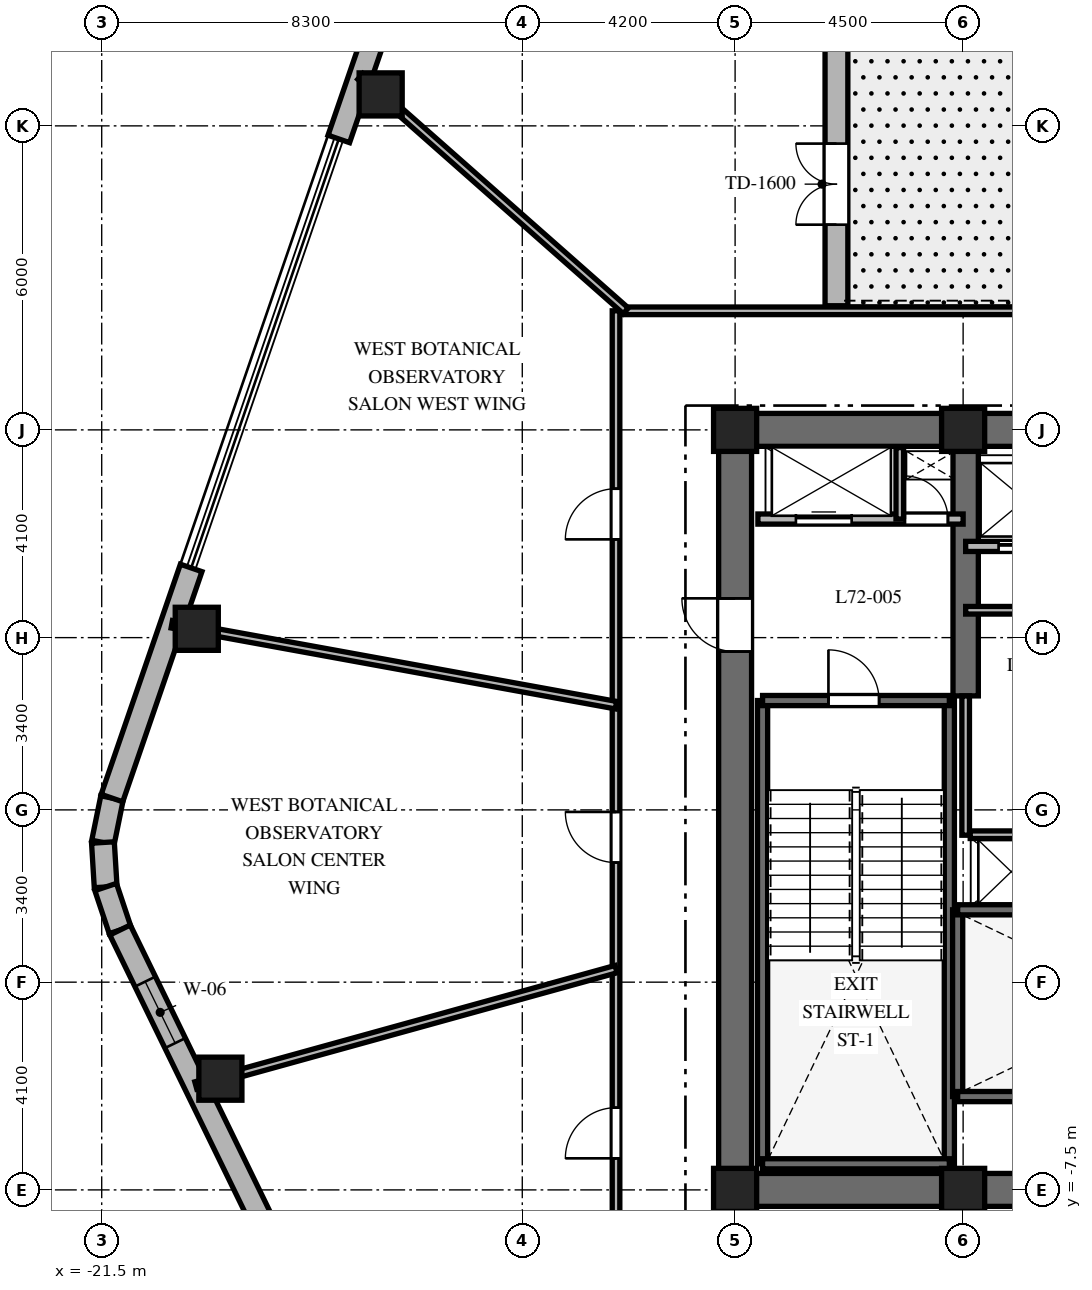
"""IFC4 building model, lengths in metres.
Left out: names, types, materials, properties, quantities, classifications, styles, units other than length and angle.
Written with IfcOpenShell. Run it as: python <this file> out.ifc"""

import sys

from ifc_helpers import new_model, si_unit, direction, frame, frame_2d, origin, origin_2d, place, context, subcontext, project, spatial, rectangle, extrude, element, fill, save


model = new_model("IFC4")
c1 = context("Model", 3, precision=1e-05, world=origin(), true_north=direction((0.0, 1.0)))
c2 = subcontext(c1, "Body", "Model", "MODEL_VIEW")
j1 = project(units=[si_unit("LENGTHUNIT", "METRE"), si_unit("PLANEANGLEUNIT", "RADIAN")], contexts=[c1])
p1 = place(None, origin())
s1 = spatial("IfcSite", under=j1, at=p1, CompositionType="ELEMENT")
p2 = place(p1, origin())
s2 = spatial("IfcBuilding", under=s1, at=p2, CompositionType="ELEMENT")
p3 = place(p2, frame((0.0, 0.0, 288.6)))
s3 = spatial("IfcBuildingStorey", under=s2, at=p3, CompositionType="ELEMENT", Elevation=288.6)
p4 = place(p3, frame((-9.325, -7.5, 0.0), z_axis=(0.0, 0.0, 1.0), x_axis=(1.0, 0.0, 0.0)))
e1 = element("IfcWall", 1, at=p4, inside=s3, PredefinedType="SHEAR", context=c2, shape_type="SweptSolid", body=[
    extrude(rectangle(XDim=18.65, YDim=0.65, at=frame_2d((9.325, 0.0))), origin(), (0.0, 0.0, 1.0), 4.5),
])
p5 = place(p4, frame((9.375, 0.0, 0.0)))
e2 = element("IfcOpeningElement", 2, at=p5, cuts=e1, PredefinedType="OPENING", context=c2, shape_type="SweptSolid", body=[
    extrude(rectangle(XDim=1.0, YDim=2.15, at=frame_2d((0.5, 1.075))), frame((0.0, 0.335, 0.0), z_axis=(0.0, -1.0, 0.0), x_axis=(1.0, 0.0, 0.0)), (0.0, 0.0, 1.0), 0.67),
])
p6 = place(p3, frame((-9.325, 7.5, 0.0), z_axis=(0.0, 0.0, 1.0), x_axis=(1.0, 0.0, 0.0)))
e3 = element("IfcWall", 3, at=p6, inside=s3, PredefinedType="SHEAR", context=c2, shape_type="SweptSolid", body=[
    extrude(rectangle(XDim=9.375, YDim=0.65, at=frame_2d((4.688, 0.0))), origin(), (0.0, 0.0, 1.0), 4.5),
])
p7 = place(p3, frame((-9.0, -7.175, 0.0), z_axis=(0.0, 0.0, 1.0), x_axis=(0.0, 1.0, 0.0)))
e4 = element("IfcWall", 4, at=p7, inside=s3, PredefinedType="SHEAR", context=c2, shape_type="SweptSolid", body=[
    extrude(rectangle(XDim=14.35, YDim=0.65, at=frame_2d((7.175, 0.0))), origin(), (0.0, 0.0, 1.0), 4.5),
])
p8 = place(p7, frame((10.3, 0.0, 0.0)))
e5 = element("IfcOpeningElement", 5, at=p8, cuts=e4, PredefinedType="OPENING", context=c2, shape_type="SweptSolid", body=[
    extrude(rectangle(XDim=1.05, YDim=2.15, at=frame_2d((0.525, 1.075))), frame((0.0, 0.335, 0.0), z_axis=(0.0, -1.0, 0.0), x_axis=(1.0, 0.0, 0.0)), (0.0, 0.0, 1.0), 0.67),
])
p9 = place(p3, frame((-4.45, 2.25, 0.0), z_axis=(0.0, 0.0, 1.0), x_axis=(0.0, 1.0, 0.0)))
e6 = element("IfcWall", 6, at=p9, inside=s3, PredefinedType="SHEAR", context=c2, shape_type="SweptSolid", body=[
    extrude(rectangle(XDim=4.925, YDim=0.5, at=frame_2d((2.462, 0.0))), origin(), (0.0, 0.0, 1.0), 4.5),
])
for number, where, z_axis, x_axis in (
    (7, (-8.458, -6.985, 0.0), (0.0, 0.0, 1.0), (0.0, 1.0, 0.0)),
    (8, (-4.772, -6.985, 0.0), (0.0, 0.0, 1.0), (0.0, 1.0, 0.0)),
):
    element("IfcWall", number, at=place(p3, frame(where, z_axis=z_axis, x_axis=x_axis)), inside=s3, PredefinedType="SHEAR", context=c2, shape_type="SweptSolid", body=[
        extrude(rectangle(XDim=9.143, YDim=0.2, at=frame_2d((4.572, 0.0))), origin(), (0.0, 0.0, 1.0), 4.5),
    ])
p10 = place(p3, frame((-8.458, -6.985, 0.0), z_axis=(0.0, 0.0, 1.0), x_axis=(1.0, 0.0, 0.0)))
e9 = element("IfcWall", 9, at=p10, inside=s3, PredefinedType="SHEAR", context=c2, shape_type="SweptSolid", body=[
    extrude(rectangle(XDim=3.686, YDim=0.2, at=frame_2d((1.843, 0.0))), origin(), (0.0, 0.0, 1.0), 4.5),
])
p11 = place(p3, frame((-8.458, 2.158, 0.0), z_axis=(0.0, 0.0, 1.0), x_axis=(1.0, 0.0, 0.0)))
e10 = element("IfcWall", 10, at=p11, inside=s3, PredefinedType="SHEAR", context=c2, shape_type="SweptSolid", body=[
    extrude(rectangle(XDim=3.686, YDim=0.2, at=frame_2d((1.843, 0.0))), origin(), (0.0, 0.0, 1.0), 4.5),
])
p12 = place(p11, frame((1.3, 0.0, 0.0)))
e11 = element("IfcOpeningElement", 11, at=p12, cuts=e10, PredefinedType="OPENING", context=c2, shape_type="SweptSolid", body=[
    extrude(rectangle(XDim=1.0, YDim=2.15, at=frame_2d((0.5, 1.075))), frame((0.0, 0.11, 0.0), z_axis=(0.0, -1.0, 0.0), x_axis=(1.0, 0.0, 0.0)), (0.0, 0.0, 1.0), 0.22),
])
p13 = place(p3, frame((-4.608, -5.658, 0.0), z_axis=(0.0, 0.0, 1.0), x_axis=(0.0, 1.0, 0.0)))
e12 = element("IfcWall", 12, at=p13, inside=s3, PredefinedType="SHEAR", context=c2, shape_type="SweptSolid", body=[
    extrude(rectangle(XDim=3.686, YDim=0.2, at=frame_2d((1.843, 0.0))), origin(), (0.0, 0.0, 1.0), 4.5),
])
p14 = place(p3, frame((-4.608, -5.658, 0.0), z_axis=(0.0, 0.0, 1.0), x_axis=(1.0, 0.0, 0.0)))
e13 = element("IfcWall", 13, at=p14, inside=s3, PredefinedType="SHEAR", context=c2, shape_type="SweptSolid", body=[
    extrude(rectangle(XDim=9.166, YDim=0.2, at=frame_2d((4.583, 0.0))), origin(), (0.0, 0.0, 1.0), 4.5),
])
p15 = place(p14, frame((7.45, 0.0, 0.0)))
e14 = element("IfcOpeningElement", 14, at=p15, cuts=e13, PredefinedType="OPENING", context=c2, shape_type="SweptSolid", body=[
    extrude(rectangle(XDim=1.0, YDim=2.15, at=frame_2d((0.5, 1.075))), frame((0.0, 0.11, 0.0), z_axis=(0.0, -1.0, 0.0), x_axis=(1.0, 0.0, 0.0)), (0.0, 0.0, 1.0), 0.22),
])
p16 = place(p3, frame((-4.608, -1.972, 0.0), z_axis=(0.0, 0.0, 1.0), x_axis=(1.0, 0.0, 0.0)))
e15 = element("IfcWall", 15, at=p16, inside=s3, PredefinedType="SHEAR", context=c2, shape_type="SweptSolid", body=[
    extrude(rectangle(XDim=9.166, YDim=0.2, at=frame_2d((4.583, 0.0))), origin(), (0.0, 0.0, 1.0), 4.5),
])
for number, where, z_axis, x_axis in (
    (16, (-9.0, -7.5, 0.0), (0.0, 0.0, 1.0), (1.0, 0.0, 0.0)),
    (17, (-4.5, -7.5, 0.0), (0.0, 0.0, 1.0), (1.0, 0.0, 0.0)),
    (18, (-4.5, 7.5, 0.0), (0.0, 0.0, 1.0), (1.0, 0.0, 0.0)),
    (19, (-9.0, 7.5, 0.0), (0.0, 0.0, 1.0), (1.0, 0.0, 0.0)),
    (20, (-15.995, 14.121, 0.0), (0.0, 0.0, 1.0), (1.0, 0.0, 0.0)),
    (21, (-19.624, 3.574, 0.0), (0.0, 0.0, 1.0), (1.0, 0.0, 0.0)),
    (22, (-19.158, -5.305, 0.0), (0.0, 0.0, 1.0), (1.0, 0.0, 0.0)),
):
    element("IfcColumn", number, at=place(p3, frame(where, z_axis=z_axis, x_axis=x_axis)), inside=s3, PredefinedType="COLUMN", context=c2, shape_type="SweptSolid", body=[
        extrude(rectangle(XDim=0.85, YDim=0.85, at=origin_2d()), origin(), (0.0, 0.0, 1.0), 4.5),
    ])
p17 = place(p3, frame((-21.298, 0.233, 0.0), z_axis=(0.0, 0.0, 1.0), x_axis=(-0.199158176661, -0.979967356941, 0.0)))
e23 = element("IfcWall", 23, at=p17, inside=s3, PredefinedType="SOLIDWALL", context=c2, shape_type="SweptSolid", body=[
    extrude(rectangle(XDim=0.895, YDim=0.45, at=frame_2d((0.447, 0.0))), origin(), (0.0, 0.0, 1.0), 4.18),
])
p18 = place(p3, frame((-21.476, -0.644, 0.0), z_axis=(0.0, 0.0, 1.0), x_axis=(0.061031097918, -0.998135865044, 0.0)))
e24 = element("IfcWall", 24, at=p18, inside=s3, PredefinedType="SOLIDWALL", context=c2, shape_type="SweptSolid", body=[
    extrude(rectangle(XDim=0.88, YDim=0.45, at=frame_2d((0.44, 0.0))), origin(), (0.0, 0.0, 1.0), 4.18),
])
p19 = place(p3, frame((-21.422, -1.522, 0.0), z_axis=(0.0, 0.0, 1.0), x_axis=(0.316964162323, -0.94843751497, 0.0)))
e25 = element("IfcWall", 25, at=p19, inside=s3, PredefinedType="SOLIDWALL", context=c2, shape_type="SweptSolid", body=[
    extrude(rectangle(XDim=0.895, YDim=0.45, at=frame_2d((0.448, 0.0))), origin(), (0.0, 0.0, 1.0), 4.18),
])
p20 = place(p3, frame((-7.0, 9.95, 0.0), z_axis=(0.0, 0.0, 1.0), x_axis=(0.0, 1.0, 0.0)))
e26 = element("IfcWall", 26, at=p20, inside=s3, PredefinedType="SOLIDWALL", context=c2, shape_type="SweptSolid", body=[
    extrude(rectangle(XDim=10.125, YDim=0.45, at=frame_2d((5.062, 0.0))), origin(), (0.0, 0.0, 1.0), 4.18),
])
p21 = place(p20, frame((1.6, 0.0, 0.0)))
e27 = element("IfcOpeningElement", 27, at=p21, cuts=e26, PredefinedType="OPENING", context=c2, shape_type="SweptSolid", body=[
    extrude(rectangle(XDim=1.6, YDim=2.25, at=frame_2d((0.8, 1.125))), frame((0.0, 0.235, 0.0), z_axis=(0.0, -1.0, 0.0), x_axis=(1.0, 0.0, 0.0)), (0.0, 0.0, 1.0), 0.47),
])
p22 = place(p3, frame((-15.26, 17.776, 0.0), z_axis=(0.0, 0.0, 1.0), x_axis=(-0.325408461582, -0.945573547182, 0.0)))
e28 = element("IfcWall", 28, at=p22, inside=s3, PredefinedType="SOLIDWALL", context=c2, shape_type="SweptSolid", body=[
    extrude(rectangle(XDim=4.795, YDim=0.45, at=frame_2d((2.397, 0.0))), origin(), (0.0, 0.0, 1.0), 4.18),
])
p23 = place(p3, frame((-19.734, 4.775, 0.0), z_axis=(0.0, 0.0, 1.0), x_axis=(-0.325437701015, -0.945563484256, 0.0)))
e29 = element("IfcWall", 29, at=p23, inside=s3, PredefinedType="SOLIDWALL", context=c2, shape_type="SweptSolid", body=[
    extrude(rectangle(XDim=4.803, YDim=0.45, at=frame_2d((2.402, 0.0))), origin(), (0.0, 0.0, 1.0), 4.18),
])
p24 = place(p3, frame((-21.138, -2.371, 0.0), z_axis=(0.0, 0.0, 1.0), x_axis=(0.438128124058, -0.89891253574, 0.0)))
e30 = element("IfcWall", 30, at=p24, inside=s3, PredefinedType="SOLIDWALL", context=c2, shape_type="SweptSolid", body=[
    extrude(rectangle(XDim=17.565, YDim=0.45, at=frame_2d((8.782, 0.0))), origin(), (0.0, 0.0, 1.0), 4.18),
])
p25 = place(p24, frame((1.133, 0.0, 0.8)))
e31 = element("IfcOpeningElement", 31, at=p25, cuts=e30, PredefinedType="OPENING", context=c2, shape_type="SweptSolid", body=[
    extrude(rectangle(XDim=1.35, YDim=1.75, at=frame_2d((0.675, 0.875))), frame((0.0, 0.235, 0.0), z_axis=(0.0, -1.0, 0.0), x_axis=(1.0, 0.0, 0.0)), (0.0, 0.0, 1.0), 0.47),
])
p26 = place(p24, frame((8.158, 0.0, 0.8)))
e32 = element("IfcOpeningElement", 32, at=p26, cuts=e30, PredefinedType="OPENING", context=c2, shape_type="SweptSolid", body=[
    extrude(rectangle(XDim=1.35, YDim=1.75, at=frame_2d((0.675, 0.875))), frame((0.0, 0.235, 0.0), z_axis=(0.0, -1.0, 0.0), x_axis=(1.0, 0.0, 0.0)), (0.0, 0.0, 1.0), 0.47),
])
p27 = place(p24, frame((15.132, 0.0, 0.8)))
e33 = element("IfcOpeningElement", 33, at=p27, cuts=e30, PredefinedType="OPENING", context=c2, shape_type="SweptSolid", body=[
    extrude(rectangle(XDim=1.35, YDim=1.75, at=frame_2d((0.675, 0.875))), frame((0.0, 0.235, 0.0), z_axis=(0.0, -1.0, 0.0), x_axis=(1.0, 0.0, 0.0)), (0.0, 0.0, 1.0), 0.47),
])
p28 = place(p3, frame((-8.55, 5.74, 0.0), z_axis=(0.0, 0.0, 1.0), x_axis=(1.0, 0.0, 0.0)))
e34 = element("IfcWall", 34, at=p28, inside=s3, PredefinedType="PARTITIONING", context=c2, shape_type="SweptSolid", body=[
    extrude(rectangle(XDim=4.05, YDim=0.2, at=frame_2d((2.025, 0.0))), origin(), (0.0, 0.0, 1.0), 4.18),
])
p29 = place(p28, frame((0.75, 0.0, 0.0)))
e35 = element("IfcOpeningElement", 35, at=p29, cuts=e34, PredefinedType="OPENING", context=c2, shape_type="SweptSolid", body=[
    extrude(rectangle(XDim=1.1, YDim=2.2, at=frame_2d((0.55, 1.1))), frame((0.0, 0.11, 0.0), z_axis=(0.0, -1.0, 0.0), x_axis=(1.0, 0.0, 0.0)), (0.0, 0.0, 1.0), 0.22),
])
p30 = place(p28, frame((2.9, 0.0, 0.0)))
e36 = element("IfcOpeningElement", 36, at=p30, cuts=e34, PredefinedType="OPENING", context=c2, shape_type="SweptSolid", body=[
    extrude(rectangle(XDim=0.85, YDim=2.03, at=frame_2d((0.425, 1.015))), frame((0.0, 0.11, 0.0), z_axis=(0.0, -1.0, 0.0), x_axis=(1.0, 0.0, 0.0)), (0.0, 0.0, 1.0), 0.22),
])
p31 = place(p3, frame((-5.75, 5.74, 0.0), z_axis=(0.0, 0.0, 1.0), x_axis=(0.0, 1.0, 0.0)))
e37 = element("IfcWall", 37, at=p31, inside=s3, PredefinedType="PARTITIONING", context=c2, shape_type="SweptSolid", body=[
    extrude(rectangle(XDim=1.41, YDim=0.15, at=frame_2d((0.705, 0.0))), origin(), (0.0, 0.0, 1.0), 4.18),
])
p32 = place(p3, frame((-4.45, 5.2, 0.0), z_axis=(0.0, 0.0, 1.0), x_axis=(1.0, 0.0, 0.0)))
e38 = element("IfcWall", 38, at=p32, inside=s3, PredefinedType="PARTITIONING", context=c2, shape_type="SweptSolid", body=[
    extrude(rectangle(XDim=4.5, YDim=0.2, at=frame_2d((2.25, 0.0))), origin(), (0.0, 0.0, 1.0), 4.18),
])
p33 = place(p32, frame((0.65, 0.0, 0.0)))
e39 = element("IfcOpeningElement", 39, at=p33, cuts=e38, PredefinedType="OPENING", context=c2, shape_type="SweptSolid", body=[
    extrude(rectangle(XDim=1.0, YDim=2.2, at=frame_2d((0.5, 1.1))), frame((0.0, 0.11, 0.0), z_axis=(0.0, -1.0, 0.0), x_axis=(1.0, 0.0, 0.0)), (0.0, 0.0, 1.0), 0.22),
])
p34 = place(p32, frame((2.85, 0.0, 0.0)))
e40 = element("IfcOpeningElement", 40, at=p34, cuts=e38, PredefinedType="OPENING", context=c2, shape_type="SweptSolid", body=[
    extrude(rectangle(XDim=1.0, YDim=2.2, at=frame_2d((0.5, 1.1))), frame((0.0, 0.11, 0.0), z_axis=(0.0, -1.0, 0.0), x_axis=(1.0, 0.0, 0.0)), (0.0, 0.0, 1.0), 0.22),
])
p35 = place(p3, frame((-4.45, -0.5, 0.0), z_axis=(0.0, 0.0, 1.0), x_axis=(0.0, 1.0, 0.0)))
e41 = element("IfcWall", 41, at=p35, inside=s3, PredefinedType="PARTITIONING", context=c2, shape_type="SweptSolid", body=[
    extrude(rectangle(XDim=2.75, YDim=0.15, at=frame_2d((1.375, 0.0))), origin(), (0.0, 0.0, 1.0), 4.18),
])
p36 = place(p3, frame((-4.45, 3.94, 0.0), z_axis=(0.0, 0.0, 1.0), x_axis=(1.0, 0.0, 0.0)))
e42 = element("IfcWall", 42, at=p36, inside=s3, PredefinedType="PARTITIONING", context=c2, shape_type="SweptSolid", body=[
    extrude(rectangle(XDim=2.55, YDim=0.15, at=frame_2d((1.275, 0.0))), origin(), (0.0, 0.0, 1.0), 4.18),
])
p37 = place(p3, frame((-4.36, -0.49, 0.0), z_axis=(0.0, 0.0, 1.0), x_axis=(1.0, 0.0, 0.0)))
e43 = element("IfcWall", 43, at=p37, inside=s3, PredefinedType="PARTITIONING", context=c2, shape_type="SweptSolid", body=[
    extrude(rectangle(XDim=8.72, YDim=0.15, at=frame_2d((4.36, 0.0))), origin(), (0.0, 0.0, 1.0), 4.18),
])
p38 = place(p37, frame((2.81, 0.0, 0.0)))
e44 = element("IfcOpeningElement", 44, at=p38, cuts=e43, PredefinedType="OPENING", context=c2, shape_type="SweptSolid", body=[
    extrude(rectangle(XDim=0.85, YDim=2.03, at=frame_2d((0.425, 1.015))), frame((0.0, 0.085, 0.0), z_axis=(0.0, -1.0, 0.0), x_axis=(1.0, 0.0, 0.0)), (0.0, 0.0, 1.0), 0.17),
])
p39 = place(p37, frame((4.61, 0.0, 0.0)))
e45 = element("IfcOpeningElement", 45, at=p39, cuts=e43, PredefinedType="OPENING", context=c2, shape_type="SweptSolid", body=[
    extrude(rectangle(XDim=0.85, YDim=2.03, at=frame_2d((0.425, 1.015))), frame((0.0, 0.085, 0.0), z_axis=(0.0, -1.0, 0.0), x_axis=(1.0, 0.0, 0.0)), (0.0, 0.0, 1.0), 0.17),
])
p40 = place(p3, frame((-11.35, 9.85, 0.0), z_axis=(0.0, 0.0, 1.0), x_axis=(1.0, 0.0, 0.0)))
e46 = element("IfcWall", 46, at=p40, inside=s3, PredefinedType="PARTITIONING", context=c2, shape_type="SweptSolid", body=[
    extrude(rectangle(XDim=22.7, YDim=0.15, at=frame_2d((11.35, 0.0))), origin(), (0.0, 0.0, 1.0), 3.67),
])
p41 = place(p40, frame((18.896, 0.0, 0.0)))
e47 = element("IfcOpeningElement", 47, at=p41, cuts=e46, PredefinedType="OPENING", context=c2, shape_type="SweptSolid", body=[
    extrude(rectangle(XDim=1.0, YDim=2.03, at=frame_2d((0.5, 1.015))), frame((0.0, 0.085, 0.0), z_axis=(0.0, -1.0, 0.0), x_axis=(1.0, 0.0, 0.0)), (0.0, 0.0, 1.0), 0.17),
])
p42 = place(p3, frame((-11.35, -9.85, 0.0), z_axis=(0.0, 0.0, 1.0), x_axis=(0.0, 1.0, 0.0)))
e48 = element("IfcWall", 48, at=p42, inside=s3, PredefinedType="PARTITIONING", context=c2, shape_type="SweptSolid", body=[
    extrude(rectangle(XDim=19.7, YDim=0.15, at=frame_2d((9.85, 0.0))), origin(), (0.0, 0.0, 1.0), 3.67),
])
p43 = place(p42, frame((15.189, 0.0, 0.0)))
e49 = element("IfcOpeningElement", 49, at=p43, cuts=e48, PredefinedType="OPENING", context=c2, shape_type="SweptSolid", body=[
    extrude(rectangle(XDim=1.0, YDim=2.03, at=frame_2d((0.5, 1.015))), frame((0.0, 0.085, 0.0), z_axis=(0.0, -1.0, 0.0), x_axis=(1.0, 0.0, 0.0)), (0.0, 0.0, 1.0), 0.17),
])
p44 = place(p42, frame((8.81, 0.0, 0.0)))
e50 = element("IfcOpeningElement", 50, at=p44, cuts=e48, PredefinedType="OPENING", context=c2, shape_type="SweptSolid", body=[
    extrude(rectangle(XDim=1.0, YDim=2.03, at=frame_2d((0.5, 1.015))), frame((0.0, 0.085, 0.0), z_axis=(0.0, -1.0, 0.0), x_axis=(1.0, 0.0, 0.0)), (0.0, 0.0, 1.0), 0.17),
])
p45 = place(p42, frame((2.973, 0.0, 0.0)))
e51 = element("IfcOpeningElement", 51, at=p45, cuts=e48, PredefinedType="OPENING", context=c2, shape_type="SweptSolid", body=[
    extrude(rectangle(XDim=1.0, YDim=2.03, at=frame_2d((0.5, 1.015))), frame((0.0, 0.085, 0.0), z_axis=(0.0, -1.0, 0.0), x_axis=(1.0, 0.0, 0.0)), (0.0, 0.0, 1.0), 0.17),
])
p46 = place(p3, frame((-11.157, 9.85, 0.0), z_axis=(0.0, 0.0, 1.0), x_axis=(-0.74966962095, 0.661812253909, 0.0)))
e52 = element("IfcWall", 52, at=p46, inside=s3, PredefinedType="PARTITIONING", context=c2, shape_type="SweptSolid", body=[
    extrude(rectangle(XDim=6.989, YDim=0.15, at=frame_2d((3.494, 0.0))), origin(), (0.0, 0.0, 1.0), 3.52),
])
p47 = place(p3, frame((-11.35, 2.067, 0.0), z_axis=(0.0, 0.0, 1.0), x_axis=(-0.983816386236, 0.179179569634, 0.0)))
e53 = element("IfcWall", 53, at=p47, inside=s3, PredefinedType="PARTITIONING", context=c2, shape_type="SweptSolid", body=[
    extrude(rectangle(XDim=8.911, YDim=0.15, at=frame_2d((4.456, 0.0))), origin(), (0.0, 0.0, 1.0), 3.52),
])
p48 = place(p3, frame((-11.35, -3.143, 0.0), z_axis=(0.0, 0.0, 1.0), x_axis=(-0.963731818141, -0.266872596386, 0.0)))
e54 = element("IfcWall", 54, at=p48, inside=s3, PredefinedType="PARTITIONING", context=c2, shape_type="SweptSolid", body=[
    extrude(rectangle(XDim=8.605, YDim=0.15, at=frame_2d((4.302, 0.0))), origin(), (0.0, 0.0, 1.0), 3.52),
])
p49 = place(p21, origin())
e55 = element("IfcDoor", 55, at=p49, inside=s3, OperationType="DOUBLE_SWING_LEFT", PredefinedType="DOOR", context=c2, shape_type="SweptSolid", body=[
    extrude(rectangle(XDim=1.6, YDim=2.25, at=frame_2d((0.8, 1.125))), frame((0.0, 0.025, 0.0), z_axis=(0.0, -1.0, 0.0), x_axis=(1.0, 0.0, 0.0)), (0.0, 0.0, 1.0), 0.05),
])
fill(e27, e55)
p50 = place(p25, origin())
e56 = element("IfcWindow", 56, at=p50, inside=s3, PartitioningType="SINGLE_PANEL", PredefinedType="WINDOW", context=c2, shape_type="SweptSolid", body=[
    extrude(rectangle(XDim=1.35, YDim=1.75, at=frame_2d((0.675, 0.875))), frame((0.0, 0.03, 0.0), z_axis=(0.0, -1.0, 0.0), x_axis=(1.0, 0.0, 0.0)), (0.0, 0.0, 1.0), 0.06),
])
fill(e31, e56)
p51 = place(p12, origin())
e57 = element("IfcDoor", 57, at=p51, inside=s3, OperationType="SINGLE_SWING_LEFT", PredefinedType="DOOR", context=c2, shape_type="SweptSolid", body=[
    extrude(rectangle(XDim=1.0, YDim=2.15, at=frame_2d((0.5, 1.075))), frame((0.0, 0.025, 0.0), z_axis=(0.0, -1.0, 0.0), x_axis=(1.0, 0.0, 0.0)), (0.0, 0.0, 1.0), 0.05),
])
fill(e11, e57)
p52 = place(p8, origin())
e58 = element("IfcDoor", 58, at=p52, inside=s3, OperationType="SINGLE_SWING_RIGHT", PredefinedType="DOOR", context=c2, shape_type="SweptSolid", body=[
    extrude(rectangle(XDim=1.05, YDim=2.15, at=frame_2d((0.525, 1.075))), frame((0.0, 0.025, 0.0), z_axis=(0.0, -1.0, 0.0), x_axis=(1.0, 0.0, 0.0)), (0.0, 0.0, 1.0), 0.05),
])
fill(e5, e58)
p53 = place(p29, origin())
e59 = element("IfcDoor", 59, at=p53, inside=s3, OperationType="SLIDING_TO_LEFT", PredefinedType="DOOR", context=c2, shape_type="SweptSolid", body=[
    extrude(rectangle(XDim=1.1, YDim=2.2, at=frame_2d((0.55, 1.1))), frame((0.0, 0.025, 0.0), z_axis=(0.0, -1.0, 0.0), x_axis=(1.0, 0.0, 0.0)), (0.0, 0.0, 1.0), 0.05),
])
fill(e35, e59)
p54 = place(p30, origin())
e60 = element("IfcDoor", 60, at=p54, inside=s3, OperationType="SINGLE_SWING_LEFT", PredefinedType="DOOR", context=c2, shape_type="SweptSolid", body=[
    extrude(rectangle(XDim=0.85, YDim=2.03, at=frame_2d((0.425, 1.015))), frame((0.0, 0.025, 0.0), z_axis=(0.0, -1.0, 0.0), x_axis=(1.0, 0.0, 0.0)), (0.0, 0.0, 1.0), 0.05),
])
fill(e36, e60)
p55 = place(p33, origin())
e61 = element("IfcDoor", 61, at=p55, inside=s3, OperationType="SLIDING_TO_LEFT", PredefinedType="DOOR", context=c2, shape_type="SweptSolid", body=[
    extrude(rectangle(XDim=1.0, YDim=2.2, at=frame_2d((0.5, 1.1))), frame((0.0, 0.025, 0.0), z_axis=(0.0, -1.0, 0.0), x_axis=(1.0, 0.0, 0.0)), (0.0, 0.0, 1.0), 0.05),
])
fill(e39, e61)
p56 = place(p43, origin())
e62 = element("IfcDoor", 62, at=p56, inside=s3, OperationType="SINGLE_SWING_LEFT", PredefinedType="DOOR", context=c2, shape_type="SweptSolid", body=[
    extrude(rectangle(XDim=1.0, YDim=2.03, at=frame_2d((0.5, 1.015))), frame((0.0, 0.025, 0.0), z_axis=(0.0, -1.0, 0.0), x_axis=(1.0, 0.0, 0.0)), (0.0, 0.0, 1.0), 0.05),
])
fill(e49, e62)
p57 = place(p44, origin())
e63 = element("IfcDoor", 63, at=p57, inside=s3, OperationType="SINGLE_SWING_RIGHT", PredefinedType="DOOR", context=c2, shape_type="SweptSolid", body=[
    extrude(rectangle(XDim=1.0, YDim=2.03, at=frame_2d((0.5, 1.015))), frame((0.0, 0.025, 0.0), z_axis=(0.0, -1.0, 0.0), x_axis=(1.0, 0.0, 0.0)), (0.0, 0.0, 1.0), 0.05),
])
fill(e50, e63)
p58 = place(p45, origin())
e64 = element("IfcDoor", 64, at=p58, inside=s3, OperationType="SINGLE_SWING_LEFT", PredefinedType="DOOR", context=c2, shape_type="SweptSolid", body=[
    extrude(rectangle(XDim=1.0, YDim=2.03, at=frame_2d((0.5, 1.015))), frame((0.0, 0.025, 0.0), z_axis=(0.0, -1.0, 0.0), x_axis=(1.0, 0.0, 0.0)), (0.0, 0.0, 1.0), 0.05),
])
fill(e51, e64)
save(model, sys.argv[1])
